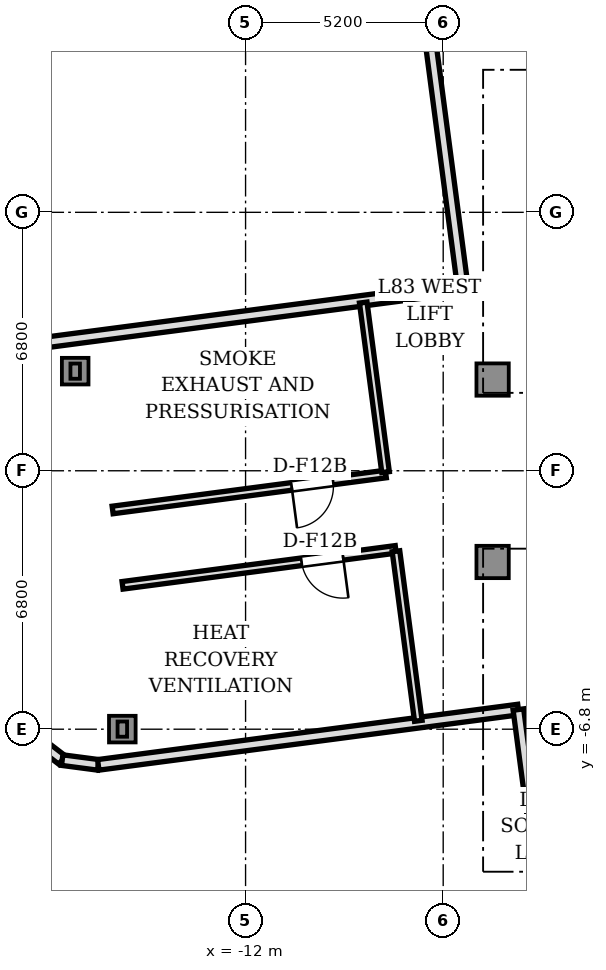
"""IFC4 building model, lengths in metres.
Left out: names, types, materials, properties, quantities, classifications, styles, units other than length and angle.
Written with IfcOpenShell. Run it as: python <this file> out.ifc"""

import sys

from ifc_helpers import new_model, si_unit, direction, frame, frame_2d, origin, origin_2d, place, context, subcontext, project, spatial, polyline, rectangle, i_section, outline, extrude, source, transform, mapped, element, fill, save


model = new_model("IFC4")
c1 = context("Model", 3, precision=1e-05, world=origin(), true_north=direction((0.0, 1.0)))
c2 = subcontext(c1, "Body", "Model", "MODEL_VIEW")
j1 = project(units=[si_unit("LENGTHUNIT", "METRE"), si_unit("PLANEANGLEUNIT", "RADIAN")], contexts=[c1])
p1 = place(None, origin())
s1 = spatial("IfcSite", under=j1, at=p1, CompositionType="ELEMENT")
p2 = place(p1, origin())
s2 = spatial("IfcBuilding", under=s1, at=p2, CompositionType="ELEMENT")
p3 = place(p2, frame((0.0, 0.0, 300.3)))
s3 = spatial("IfcBuildingStorey", under=s2, at=p3, CompositionType="ELEMENT", Elevation=300.3)
m1 = source(origin(), c2, "Body", "SweptSolid", [
    extrude(rectangle(XDim=0.85, YDim=0.85, at=origin_2d()), origin(), (0.0, 0.0, 1.0), 4.25),
])
for number, where, z_axis, x_axis in (
    (1, (-5.5, 2.4, 0.0), (0.0, 0.0, 1.0), (1.0, 0.0, 0.0)),
    (2, (-5.5, -2.4, 0.0), (0.0, 0.0, 1.0), (1.0, 0.0, 0.0)),
):
    element("IfcColumn", number, at=place(p3, frame(where, z_axis=z_axis, x_axis=x_axis)), inside=s3, PredefinedType="COLUMN", context=c2, shape_type="MappedRepresentation", body=[
        mapped(m1, transform((0.0, 0.0, 0.0), scale=1.0)),
    ])
m2 = source(origin(), c2, "Body", "SweptSolid", [
    extrude(rectangle(XDim=0.7, YDim=0.7, at=origin_2d()), origin(), (0.0, 0.0, 1.0), 4.25),
])
for number, where, z_axis, x_axis in (
    (3, (-16.483, 2.621, 0.0), (0.0, 0.0, 1.0), (1.0, 0.0, 0.0)),
    (4, (-15.243, -6.798, 0.0), (0.0, 0.0, 1.0), (1.0, 0.0, 0.0)),
):
    element("IfcColumn", number, at=place(p3, frame(where, z_axis=z_axis, x_axis=x_axis)), inside=s3, PredefinedType="COLUMN", context=c2, shape_type="MappedRepresentation", body=[
        mapped(m2, transform((0.0, 0.0, 0.0), scale=1.0)),
    ])
m3 = source(origin(), c2, "Body", "SweptSolid", [
    extrude(i_section(OverallWidth=0.25, OverallDepth=0.4, WebThickness=0.013, FlangeThickness=0.013, FilletRadius=0.014, at=origin_2d()), origin(), (0.0, 0.0, 1.0), 0.963),
])
p4 = place(p3, frame((-16.483, 2.621, 4.25), z_axis=(0.0, 0.0, 1.0), x_axis=(1.0, 0.0, 0.0)))
e5 = element("IfcColumn", 5, at=p4, inside=s3, PredefinedType="COLUMN", context=c2, shape_type="MappedRepresentation", body=[
    mapped(m3, transform((0.0, 0.0, 0.0), scale=1.0)),
])
m4 = source(origin(), c2, "Body", "SweptSolid", [
    extrude(i_section(OverallWidth=0.25, OverallDepth=0.4, WebThickness=0.013, FlangeThickness=0.013, FilletRadius=0.014, at=origin_2d()), origin(), (0.0, 0.0, 1.0), 1.452),
])
p5 = place(p3, frame((-15.243, -6.798, 4.25), z_axis=(0.0, 0.0, 1.0), x_axis=(1.0, 0.0, 0.0)))
e6 = element("IfcColumn", 6, at=p5, inside=s3, PredefinedType="COLUMN", context=c2, shape_type="MappedRepresentation", body=[
    mapped(m4, transform((0.0, 0.0, 0.0), scale=1.0)),
])
p6 = place(p3, frame((-7.738, 15.876, 0.0), z_axis=(0.0, 0.0, 1.0), x_axis=(0.130521347626, -0.991445499165, 0.0)))
e7 = element("IfcWall", 7, at=p6, inside=s3, PredefinedType="SOLIDWALL", context=c2, shape_type="SweptSolid", body=[
    extrude(outline(polyline([(0.0, 0.0), (11.15, 0.0), (11.15, 9.225), (0.0, 8.652), (0.0, 0.0)])), frame((0.0, 0.14, 0.0), z_axis=(0.0, -1.0, 0.0), x_axis=(1.0, 0.0, 0.0)), (0.0, 0.0, 1.0), 0.28),
])
p7 = place(p3, frame((-6.283, 4.821, 0.0), z_axis=(0.0, 0.0, 1.0), x_axis=(-0.991445499165, -0.130521347626, 0.0)))
e8 = element("IfcWall", 8, at=p7, inside=s3, PredefinedType="SOLIDWALL", context=c2, shape_type="SweptSolid", body=[
    extrude(outline(polyline([(0.0, 0.0), (11.15, 0.0), (11.15, 4.871), (0.0, 9.225), (0.0, 0.0)])), frame((0.0, 0.14, 0.0), z_axis=(0.0, -1.0, 0.0), x_axis=(1.0, 0.0, 0.0)), (0.0, 0.0, 1.0), 0.28),
])
p8 = place(p3, frame((-17.585, -7.031, 0.0), z_axis=(0.0, 0.0, 1.0), x_axis=(0.793466811674, -0.60861352168, 0.0)))
e9 = element("IfcWall", 9, at=p8, inside=s3, PredefinedType="SOLIDWALL", context=c2, shape_type="SweptSolid", body=[
    extrude(outline(polyline([(0.0, 0.0), (0.958, 0.0), (0.958, 5.072), (0.0, 4.773), (0.0, 0.0)])), frame((0.0, 0.14, 0.0), z_axis=(0.0, -1.0, 0.0), x_axis=(1.0, 0.0, 0.0)), (0.0, 0.0, 1.0), 0.28),
])
p9 = place(p3, frame((-16.825, -7.613, 0.0), z_axis=(0.0, 0.0, 1.0), x_axis=(0.991444747987, -0.130527053476, 0.0)))
e10 = element("IfcWall", 10, at=p9, inside=s3, PredefinedType="SOLIDWALL", context=c2, shape_type="SweptSolid", body=[
    extrude(outline(polyline([(0.0, 0.0), (0.958, 0.0), (0.958, 5.446), (0.0, 5.072), (0.0, 0.0)])), frame((0.0, 0.14, 0.0), z_axis=(0.0, -1.0, 0.0), x_axis=(1.0, 0.0, 0.0)), (0.0, 0.0, 1.0), 0.28),
])
p10 = place(p3, frame((-15.876, -7.738, 0.0), z_axis=(0.0, 0.0, 1.0), x_axis=(0.991445499165, 0.130521347626, 0.0)))
e11 = element("IfcWall", 11, at=p10, inside=s3, PredefinedType="SOLIDWALL", context=c2, shape_type="SweptSolid", body=[
    extrude(outline(polyline([(0.0, 0.0), (11.15, 0.0), (11.15, 9.801), (0.0, 5.446), (0.0, 0.0)])), frame((0.0, 0.14, 0.0), z_axis=(0.0, -1.0, 0.0), x_axis=(1.0, 0.0, 0.0)), (0.0, 0.0, 1.0), 0.28),
])
p11 = place(p3, frame((-4.821, -6.283, 0.0), z_axis=(0.0, 0.0, 1.0), x_axis=(0.130521347626, -0.991445499165, 0.0)))
e12 = element("IfcWall", 12, at=p11, inside=s3, PredefinedType="SOLIDWALL", context=c2, shape_type="SweptSolid", body=[
    extrude(outline(polyline([(0.0, 0.0), (11.15, 0.0), (11.15, 10.374), (0.0, 9.801), (0.0, 0.0)])), frame((0.0, 0.14, 0.0), z_axis=(0.0, -1.0, 0.0), x_axis=(1.0, 0.0, 0.0)), (0.0, 0.0, 1.0), 0.28),
])
p12 = place(p3, frame((-8.049, -2.068, 0.0), z_axis=(0.0, 0.0, 1.0), x_axis=(-0.991445353075, -0.130522457324, 0.0)))
e13 = element("IfcWall", 13, at=p12, inside=s3, PredefinedType="SOLIDWALL", context=c2, shape_type="SweptSolid", body=[
    extrude(rectangle(XDim=7.25, YDim=0.2, at=frame_2d((3.625, 0.0))), origin(), (0.0, 0.0, 1.0), 3.7),
])
p13 = place(p12, frame((1.4, 0.0, 0.0)))
e14 = element("IfcOpeningElement", 14, at=p13, cuts=e13, PredefinedType="OPENING", context=c2, shape_type="SweptSolid", body=[
    extrude(rectangle(XDim=1.1, YDim=2.15, at=frame_2d((0.55, 1.075))), frame((0.0, 0.11, 0.0), z_axis=(0.0, -1.0, 0.0), x_axis=(1.0, 0.0, 0.0)), (0.0, 0.0, 1.0), 0.22),
])
p14 = place(p3, frame((-8.042, -2.118, 0.0), z_axis=(0.0, 0.0, 1.0), x_axis=(0.130535912089, -0.99144358168, 0.0)))
e15 = element("IfcWall", 15, at=p14, inside=s3, PredefinedType="SOLIDWALL", context=c2, shape_type="SweptSolid", body=[
    extrude(rectangle(XDim=4.5, YDim=0.2, at=frame_2d((2.25, 0.0))), origin(), (0.0, 0.0, 1.0), 3.7),
])
p15 = place(p3, frame((-8.31, -0.085, 0.0), z_axis=(0.0, 0.0, 1.0), x_axis=(-0.991445353075, -0.130522457324, 0.0)))
e16 = element("IfcWall", 16, at=p15, inside=s3, PredefinedType="SOLIDWALL", context=c2, shape_type="SweptSolid", body=[
    extrude(rectangle(XDim=7.25, YDim=0.2, at=frame_2d((3.625, 0.0))), origin(), (0.0, 0.0, 1.0), 3.7),
])
p16 = place(p15, frame((1.4, 0.0, 0.0)))
e17 = element("IfcOpeningElement", 17, at=p16, cuts=e16, PredefinedType="OPENING", context=c2, shape_type="SweptSolid", body=[
    extrude(rectangle(XDim=1.1, YDim=2.15, at=frame_2d((0.55, 1.075))), frame((0.0, 0.11, 0.0), z_axis=(0.0, -1.0, 0.0), x_axis=(1.0, 0.0, 0.0)), (0.0, 0.0, 1.0), 0.22),
])
p17 = place(p3, frame((-8.904, 4.426, 0.0), z_axis=(0.0, 0.0, 1.0), x_axis=(0.130528890923, -0.991444506079, 0.0)))
e18 = element("IfcWall", 18, at=p17, inside=s3, PredefinedType="SOLIDWALL", context=c2, shape_type="SweptSolid", body=[
    extrude(rectangle(XDim=4.5, YDim=0.2, at=frame_2d((2.25, 0.0))), origin(), (0.0, 0.0, 1.0), 3.7),
])
m5 = source(origin(), c2, "Body", "SweptSolid", [
    extrude(rectangle(XDim=1.1, YDim=0.05, at=origin_2d()), origin(), (0.0, 0.0, 1.0), 2.15),
])
p18 = place(p13, frame((0.55, 0.0, 0.0)))
e19 = element("IfcDoor", 19, at=p18, inside=s3, OperationType="SINGLE_SWING_LEFT", PredefinedType="DOOR", context=c2, shape_type="MappedRepresentation", body=[
    mapped(m5, transform((0.0, 0.0, 0.0), scale=1.0)),
])
fill(e14, e19)
p19 = place(p16, frame((0.55, 0.0, 0.0)))
e20 = element("IfcDoor", 20, at=p19, inside=s3, OperationType="SINGLE_SWING_RIGHT", PredefinedType="DOOR", context=c2, shape_type="MappedRepresentation", body=[
    mapped(m5, transform((0.0, 0.0, 0.0), scale=1.0)),
])
fill(e17, e20)
save(model, sys.argv[1])
